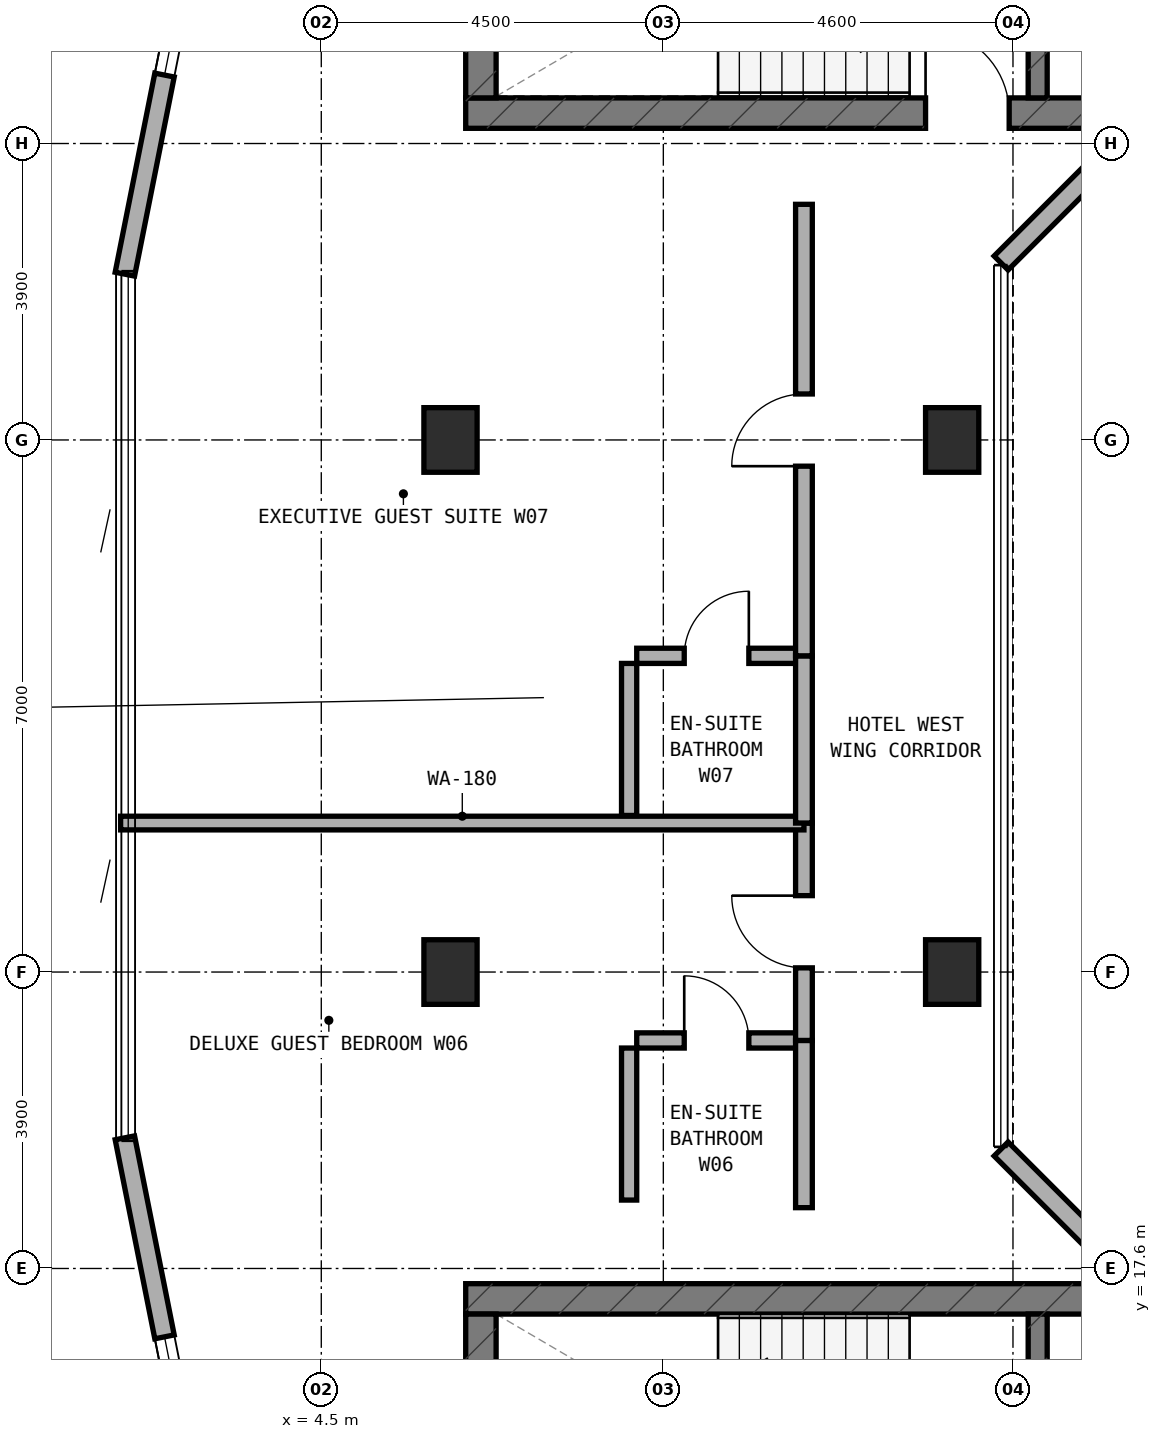
"""IFC4 building model, lengths in metres.
Left out: names, types, materials, properties, quantities, classifications, styles, units other than length and angle.
Written with IfcOpenShell. Run it as: python <this file> out.ifc"""

import sys

from ifc_helpers import new_model, si_unit, direction, frame, frame_2d, origin, origin_2d, place, context, subcontext, project, spatial, rectangle, extrude, element, fill, save


model = new_model("IFC4")
c1 = context("Model", 3, precision=1e-05, world=origin(), true_north=direction((0.0, 1.0)))
c2 = subcontext(c1, "Body", "Model", "MODEL_VIEW")
j1 = project(units=[si_unit("LENGTHUNIT", "METRE"), si_unit("PLANEANGLEUNIT", "RADIAN")], contexts=[c1])
p1 = place(None, origin())
s1 = spatial("IfcSite", under=j1, at=p1, CompositionType="ELEMENT")
p2 = place(p1, origin())
s2 = spatial("IfcBuilding", under=s1, at=p2, CompositionType="ELEMENT")
p3 = place(p2, frame((0.0, 0.0, 235.1)))
s3 = spatial("IfcBuildingStorey", under=s2, at=p3, CompositionType="ELEMENT", Elevation=235.1)
p4 = place(p3, frame((6.4, 32.8, 0.0), z_axis=(0.0, 0.0, 1.0), x_axis=(1.0, 0.0, 0.0)))
e1 = element("IfcWall", 1, at=p4, inside=s3, PredefinedType="SHEAR", context=c2, shape_type="SweptSolid", body=[
    extrude(rectangle(XDim=24.4, YDim=0.4, at=frame_2d((12.2, 0.0))), origin(), (0.0, 0.0, 1.0), 3.6),
])
p5 = place(p4, frame((6.05, 0.0, 0.0)))
e2 = element("IfcOpeningElement", 2, at=p5, cuts=e1, PredefinedType="OPENING", context=c2, shape_type="SweptSolid", body=[
    extrude(rectangle(XDim=1.1, YDim=2.15, at=frame_2d((0.55, 1.075))), frame((0.0, 0.21, 0.0), z_axis=(0.0, -1.0, 0.0), x_axis=(1.0, 0.0, 0.0)), (0.0, 0.0, 1.0), 0.42),
])
p6 = place(p3, frame((6.6, 33.0, 0.0), z_axis=(0.0, 0.0, 1.0), x_axis=(0.0, 1.0, 0.0)))
e3 = element("IfcWall", 3, at=p6, inside=s3, PredefinedType="SHEAR", context=c2, shape_type="SweptSolid", body=[
    extrude(rectangle(XDim=3.16, YDim=0.4, at=frame_2d((1.58, 0.0))), origin(), (0.0, 0.0, 1.0), 3.6),
])
p7 = place(p3, frame((13.925, 33.0, 0.0), z_axis=(0.0, 0.0, 1.0), x_axis=(0.0, 1.0, 0.0)))
e4 = element("IfcWall", 4, at=p7, inside=s3, PredefinedType="STANDARD", context=c2, shape_type="SweptSolid", body=[
    extrude(rectangle(XDim=3.16, YDim=0.25, at=frame_2d((1.58, 0.0))), origin(), (0.0, 0.0, 1.0), 3.28),
])
p8 = place(p7, frame((0.98, 0.0, 0.0)))
e5 = element("IfcOpeningElement", 5, at=p8, cuts=e4, PredefinedType="OPENING", context=c2, shape_type="SweptSolid", body=[
    extrude(rectangle(XDim=1.1, YDim=2.15, at=frame_2d((0.55, 1.075))), frame((0.0, 0.135, 0.0), z_axis=(0.0, -1.0, 0.0), x_axis=(1.0, 0.0, 0.0)), (0.0, 0.0, 1.0), 0.27),
])
p9 = place(p3, frame((6.4, 17.2, 0.0), z_axis=(0.0, 0.0, 1.0), x_axis=(1.0, 0.0, 0.0)))
e6 = element("IfcWall", 6, at=p9, inside=s3, PredefinedType="SHEAR", context=c2, shape_type="SweptSolid", body=[
    extrude(rectangle(XDim=24.4, YDim=0.4, at=frame_2d((12.2, 0.0))), origin(), (0.0, 0.0, 1.0), 3.6),
])
p10 = place(p3, frame((6.6, 13.84, 0.0), z_axis=(0.0, 0.0, 1.0), x_axis=(0.0, 1.0, 0.0)))
e7 = element("IfcWall", 7, at=p10, inside=s3, PredefinedType="SHEAR", context=c2, shape_type="SweptSolid", body=[
    extrude(rectangle(XDim=3.16, YDim=0.4, at=frame_2d((1.58, 0.0))), origin(), (0.0, 0.0, 1.0), 3.6),
])
p11 = place(p3, frame((13.925, 13.84, 0.0), z_axis=(0.0, 0.0, 1.0), x_axis=(0.0, 1.0, 0.0)))
e8 = element("IfcWall", 8, at=p11, inside=s3, PredefinedType="STANDARD", context=c2, shape_type="SweptSolid", body=[
    extrude(rectangle(XDim=3.16, YDim=0.25, at=frame_2d((1.58, 0.0))), origin(), (0.0, 0.0, 1.0), 3.28),
])
p12 = place(p11, frame((0.98, 0.0, 0.0)))
e9 = element("IfcOpeningElement", 9, at=p12, cuts=e8, PredefinedType="OPENING", context=c2, shape_type="SweptSolid", body=[
    extrude(rectangle(XDim=1.1, YDim=2.15, at=frame_2d((0.55, 1.075))), frame((0.0, 0.135, 0.0), z_axis=(0.0, -1.0, 0.0), x_axis=(1.0, 0.0, 0.0)), (0.0, 0.0, 1.0), 0.27),
])
for number, where, z_axis, x_axis in (
    (10, (6.2, 21.5, 0.0), (0.0, 0.0, 1.0), (1.0, 0.0, 0.0)),
    (11, (6.2, 28.5, 0.0), (0.0, 0.0, 1.0), (1.0, 0.0, 0.0)),
    (12, (12.8, 21.5, 0.0), (0.0, 0.0, 1.0), (1.0, 0.0, 0.0)),
    (13, (12.8, 28.5, 0.0), (0.0, 0.0, 1.0), (1.0, 0.0, 0.0)),
):
    element("IfcColumn", number, at=place(p3, frame(where, z_axis=z_axis, x_axis=x_axis)), inside=s3, PredefinedType="COLUMN", context=c2, shape_type="SweptSolid", body=[
        extrude(rectangle(XDim=0.7, YDim=0.85, at=origin_2d()), origin(), (0.0, 0.0, 1.0), 3.6),
    ])
p13 = place(p3, frame((3.629, 39.283, 0.0), z_axis=(0.0, 0.0, 1.0), x_axis=(-0.195291715883, -0.980745199176, 0.0)))
e14 = element("IfcWall", 14, at=p13, inside=s3, PredefinedType="STANDARD", context=c2, shape_type="SweptSolid", body=[
    extrude(rectangle(XDim=8.771, YDim=0.26, at=frame_2d((4.385, 0.0))), origin(), (0.0, 0.0, 1.0), 3.28),
])
p14 = place(p13, frame((4.0, 0.0, 0.85)))
e15 = element("IfcOpeningElement", 15, at=p14, cuts=e14, PredefinedType="OPENING", context=c2, shape_type="SweptSolid", body=[
    extrude(rectangle(XDim=2.1, YDim=1.5, at=frame_2d((1.05, 0.75))), frame((0.0, 0.14, 0.0), z_axis=(0.0, -1.0, 0.0), x_axis=(1.0, 0.0, 0.0)), (0.0, 0.0, 1.0), 0.28),
])
p15 = place(p3, frame((1.916, 19.319, 0.0), z_axis=(0.0, 0.0, 1.0), x_axis=(0.195291715883, -0.980745199176, 0.0)))
e16 = element("IfcWall", 16, at=p15, inside=s3, PredefinedType="STANDARD", context=c2, shape_type="SweptSolid", body=[
    extrude(rectangle(XDim=8.771, YDim=0.26, at=frame_2d((4.385, 0.0))), origin(), (0.0, 0.0, 1.0), 3.28),
])
p16 = place(p15, frame((2.67, 0.0, 0.85)))
e17 = element("IfcOpeningElement", 17, at=p16, cuts=e16, PredefinedType="OPENING", context=c2, shape_type="SweptSolid", body=[
    extrude(rectangle(XDim=2.1, YDim=1.5, at=frame_2d((1.05, 0.75))), frame((0.0, 0.14, 0.0), z_axis=(0.0, -1.0, 0.0), x_axis=(1.0, 0.0, 0.0)), (0.0, 0.0, 1.0), 0.28),
])
for number, where, z_axis, x_axis in (
    (18, (15.278, 32.662, 0.0), (0.0, 0.0, 1.0), (-0.707, -0.707, 0.0)),
    (19, (13.444, 19.172, 0.0), (0.0, 0.0, 1.0), (0.707, -0.707, 0.0)),
):
    element("IfcWall", number, at=place(p3, frame(where, z_axis=z_axis, x_axis=x_axis)), inside=s3, PredefinedType="STANDARD", context=c2, shape_type="SweptSolid", body=[
        extrude(rectangle(XDim=2.594, YDim=0.26, at=frame_2d((1.297, 0.0))), origin(), (0.0, 0.0, 1.0), 3.28),
    ])
p17 = place(p3, frame((8.65, 20.6, 0.0), z_axis=(0.0, 0.0, 1.0), x_axis=(1.0, 0.0, 0.0)))
e20 = element("IfcWall", 20, at=p17, inside=s3, PredefinedType="PLUMBINGWALL", context=c2, shape_type="SweptSolid", body=[
    extrude(rectangle(XDim=2.1, YDim=0.2, at=frame_2d((1.05, 0.0))), origin(), (0.0, 0.0, 1.0), 3.28),
])
p18 = place(p17, frame((0.625, 0.0, 0.0)))
e21 = element("IfcOpeningElement", 21, at=p18, cuts=e20, PredefinedType="OPENING", context=c2, shape_type="SweptSolid", body=[
    extrude(rectangle(XDim=0.85, YDim=2.1, at=frame_2d((0.425, 1.05))), frame((0.0, 0.11, 0.0), z_axis=(0.0, -1.0, 0.0), x_axis=(1.0, 0.0, 0.0)), (0.0, 0.0, 1.0), 0.22),
])
p19 = place(p3, frame((8.55, 18.5, 0.0), z_axis=(0.0, 0.0, 1.0), x_axis=(0.0, 1.0, 0.0)))
e22 = element("IfcWall", 22, at=p19, inside=s3, PredefinedType="PLUMBINGWALL", context=c2, shape_type="SweptSolid", body=[
    extrude(rectangle(XDim=2.0, YDim=0.2, at=frame_2d((1.0, 0.0))), origin(), (0.0, 0.0, 1.0), 3.28),
])
p20 = place(p3, frame((10.85, 18.4, 0.0), z_axis=(0.0, 0.0, 1.0), x_axis=(0.0, 1.0, 0.0)))
e23 = element("IfcWall", 23, at=p20, inside=s3, PredefinedType="SOLIDWALL", context=c2, shape_type="SweptSolid", body=[
    extrude(rectangle(XDim=2.2, YDim=0.22, at=frame_2d((1.1, 0.0))), origin(), (0.0, 0.0, 1.0), 3.28),
])
p21 = place(p3, frame((10.85, 20.6, 0.0), z_axis=(0.0, 0.0, 1.0), x_axis=(0.0, 1.0, 0.0)))
e24 = element("IfcWall", 24, at=p21, inside=s3, PredefinedType="SOLIDWALL", context=c2, shape_type="SweptSolid", body=[
    extrude(rectangle(XDim=2.86, YDim=0.22, at=frame_2d((1.43, 0.0))), origin(), (0.0, 0.0, 1.0), 2.705),
])
p22 = place(p21, frame((0.955, 0.0, 0.0)))
e25 = element("IfcOpeningElement", 25, at=p22, cuts=e24, PredefinedType="OPENING", context=c2, shape_type="SweptSolid", body=[
    extrude(rectangle(XDim=0.95, YDim=2.1, at=frame_2d((0.475, 1.05))), frame((0.0, 0.12, 0.0), z_axis=(0.0, -1.0, 0.0), x_axis=(1.0, 0.0, 0.0)), (0.0, 0.0, 1.0), 0.24),
])
p23 = place(p3, frame((1.86, 23.46, 0.0), z_axis=(0.0, 0.0, 1.0), x_axis=(1.0, 0.0, 0.0)))
e26 = element("IfcWall", 26, at=p23, inside=s3, PredefinedType="SOLIDWALL", context=c2, shape_type="SweptSolid", body=[
    extrude(rectangle(XDim=8.99, YDim=0.18, at=frame_2d((4.495, 0.0))), origin(), (0.0, 0.0, 1.0), 2.975),
])
p24 = place(p3, frame((8.65, 25.66, 0.0), z_axis=(0.0, 0.0, 1.0), x_axis=(1.0, 0.0, 0.0)))
e27 = element("IfcWall", 27, at=p24, inside=s3, PredefinedType="PLUMBINGWALL", context=c2, shape_type="SweptSolid", body=[
    extrude(rectangle(XDim=2.1, YDim=0.2, at=frame_2d((1.05, 0.0))), origin(), (0.0, 0.0, 1.0), 3.28),
])
p25 = place(p24, frame((0.625, 0.0, 0.0)))
e28 = element("IfcOpeningElement", 28, at=p25, cuts=e27, PredefinedType="OPENING", context=c2, shape_type="SweptSolid", body=[
    extrude(rectangle(XDim=0.85, YDim=2.1, at=frame_2d((0.425, 1.05))), frame((0.0, 0.11, 0.0), z_axis=(0.0, -1.0, 0.0), x_axis=(1.0, 0.0, 0.0)), (0.0, 0.0, 1.0), 0.22),
])
p26 = place(p3, frame((8.55, 23.56, 0.0), z_axis=(0.0, 0.0, 1.0), x_axis=(0.0, 1.0, 0.0)))
e29 = element("IfcWall", 29, at=p26, inside=s3, PredefinedType="PLUMBINGWALL", context=c2, shape_type="SweptSolid", body=[
    extrude(rectangle(XDim=2.0, YDim=0.2, at=frame_2d((1.0, 0.0))), origin(), (0.0, 0.0, 1.0), 3.28),
])
p27 = place(p3, frame((10.85, 23.46, 0.0), z_axis=(0.0, 0.0, 1.0), x_axis=(0.0, 1.0, 0.0)))
e30 = element("IfcWall", 30, at=p27, inside=s3, PredefinedType="SOLIDWALL", context=c2, shape_type="SweptSolid", body=[
    extrude(rectangle(XDim=2.2, YDim=0.22, at=frame_2d((1.1, 0.0))), origin(), (0.0, 0.0, 1.0), 3.28),
])
p28 = place(p3, frame((10.85, 25.66, 0.0), z_axis=(0.0, 0.0, 1.0), x_axis=(0.0, 1.0, 0.0)))
e31 = element("IfcWall", 31, at=p28, inside=s3, PredefinedType="SOLIDWALL", context=c2, shape_type="SweptSolid", body=[
    extrude(rectangle(XDim=5.94, YDim=0.22, at=frame_2d((2.97, 0.0))), origin(), (0.0, 0.0, 1.0), 2.705),
])
p29 = place(p28, frame((2.495, 0.0, 0.0)))
e32 = element("IfcOpeningElement", 32, at=p29, cuts=e31, PredefinedType="OPENING", context=c2, shape_type="SweptSolid", body=[
    extrude(rectangle(XDim=0.95, YDim=2.1, at=frame_2d((0.475, 1.05))), frame((0.0, 0.12, 0.0), z_axis=(0.0, -1.0, 0.0), x_axis=(1.0, 0.0, 0.0)), (0.0, 0.0, 1.0), 0.24),
])
p30 = place(p14, origin())
e33 = element("IfcWindow", 33, at=p30, inside=s3, PartitioningType="SINGLE_PANEL", PredefinedType="WINDOW", context=c2, shape_type="SweptSolid", body=[
    extrude(rectangle(XDim=2.1, YDim=1.5, at=frame_2d((1.05, 0.75))), frame((0.0, 0.03, 0.0), z_axis=(0.0, -1.0, 0.0), x_axis=(1.0, 0.0, 0.0)), (0.0, 0.0, 1.0), 0.06),
])
fill(e15, e33)
p31 = place(p16, origin())
e34 = element("IfcWindow", 34, at=p31, inside=s3, PartitioningType="SINGLE_PANEL", PredefinedType="WINDOW", context=c2, shape_type="SweptSolid", body=[
    extrude(rectangle(XDim=2.1, YDim=1.5, at=frame_2d((1.05, 0.75))), frame((0.0, 0.03, 0.0), z_axis=(0.0, -1.0, 0.0), x_axis=(1.0, 0.0, 0.0)), (0.0, 0.0, 1.0), 0.06),
])
fill(e17, e34)
p32 = place(p5, origin())
e35 = element("IfcDoor", 35, at=p32, inside=s3, OperationType="SINGLE_SWING_LEFT", PredefinedType="DOOR", context=c2, shape_type="SweptSolid", body=[
    extrude(rectangle(XDim=1.1, YDim=2.15, at=frame_2d((0.55, 1.075))), frame((0.0, 0.025, 0.0), z_axis=(0.0, -1.0, 0.0), x_axis=(1.0, 0.0, 0.0)), (0.0, 0.0, 1.0), 0.05),
])
fill(e2, e35)
p33 = place(p18, origin())
e36 = element("IfcDoor", 36, at=p33, inside=s3, OperationType="SINGLE_SWING_LEFT", PredefinedType="DOOR", context=c2, shape_type="SweptSolid", body=[
    extrude(rectangle(XDim=0.85, YDim=2.1, at=frame_2d((0.425, 1.05))), frame((0.0, 0.025, 0.0), z_axis=(0.0, -1.0, 0.0), x_axis=(1.0, 0.0, 0.0)), (0.0, 0.0, 1.0), 0.05),
])
fill(e21, e36)
p34 = place(p22, origin())
e37 = element("IfcDoor", 37, at=p34, inside=s3, OperationType="SINGLE_SWING_RIGHT", PredefinedType="DOOR", context=c2, shape_type="SweptSolid", body=[
    extrude(rectangle(XDim=0.95, YDim=2.1, at=frame_2d((0.475, 1.05))), frame((0.0, 0.025, 0.0), z_axis=(0.0, -1.0, 0.0), x_axis=(1.0, 0.0, 0.0)), (0.0, 0.0, 1.0), 0.05),
])
fill(e25, e37)
p35 = place(p25, origin())
e38 = element("IfcDoor", 38, at=p35, inside=s3, OperationType="SINGLE_SWING_RIGHT", PredefinedType="DOOR", context=c2, shape_type="SweptSolid", body=[
    extrude(rectangle(XDim=0.85, YDim=2.1, at=frame_2d((0.425, 1.05))), frame((0.0, 0.025, 0.0), z_axis=(0.0, -1.0, 0.0), x_axis=(1.0, 0.0, 0.0)), (0.0, 0.0, 1.0), 0.05),
])
fill(e28, e38)
p36 = place(p29, origin())
e39 = element("IfcDoor", 39, at=p36, inside=s3, OperationType="SINGLE_SWING_LEFT", PredefinedType="DOOR", context=c2, shape_type="SweptSolid", body=[
    extrude(rectangle(XDim=0.95, YDim=2.1, at=frame_2d((0.475, 1.05))), frame((0.0, 0.025, 0.0), z_axis=(0.0, -1.0, 0.0), x_axis=(1.0, 0.0, 0.0)), (0.0, 0.0, 1.0), 0.05),
])
fill(e32, e39)
save(model, sys.argv[1])
